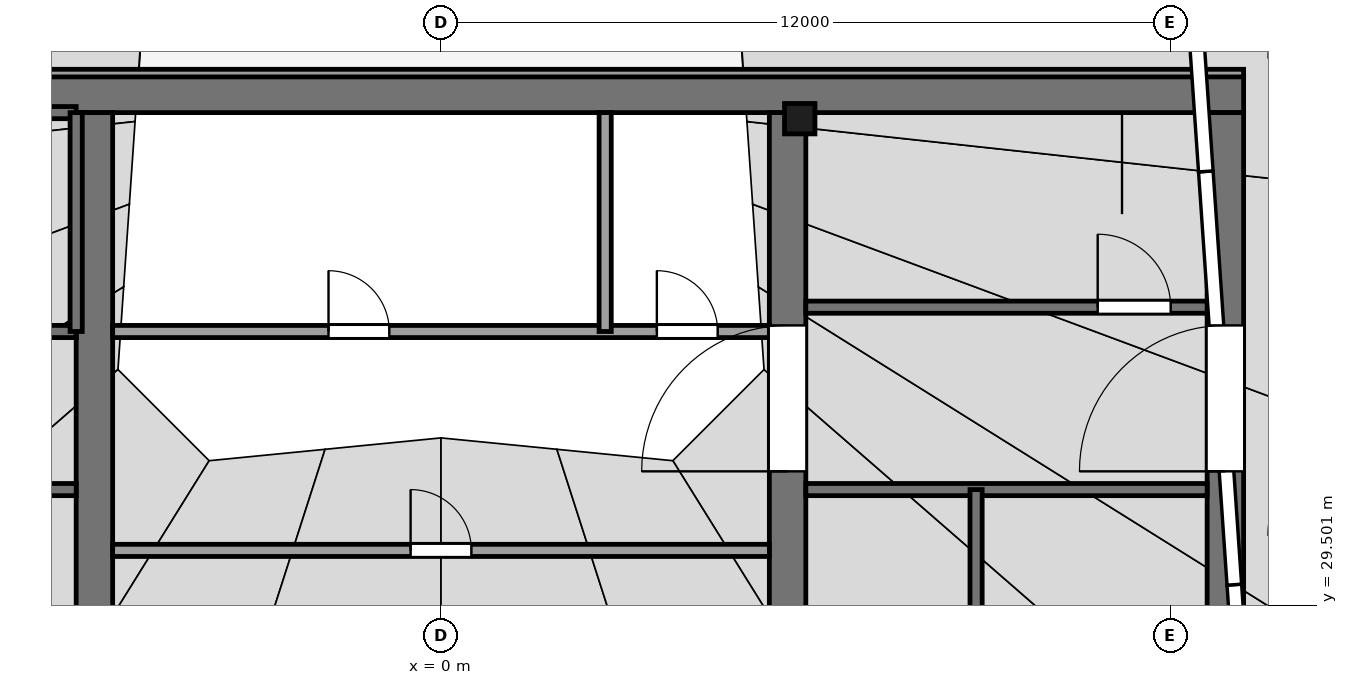
"""IFC4 building model, lengths in metres.
Left out: names, types, materials, properties, quantities, classifications, styles, units other than length and angle.
Written with IfcOpenShell. Run it as: python <this file> out.ifc"""

import sys

from ifc_helpers import new_model, si_unit, direction, frame, frame_2d, origin, origin_2d, place, context, subcontext, project, spatial, rectangle, extrude, element, fill, save


model = new_model("IFC4")
c1 = context("Model", 3, precision=1e-05, world=origin(), true_north=direction((0.0, 1.0)))
c2 = subcontext(c1, "Body", "Model", "MODEL_VIEW")
j1 = project(units=[si_unit("LENGTHUNIT", "METRE"), si_unit("PLANEANGLEUNIT", "RADIAN")], contexts=[c1])
p1 = place(None, origin())
s1 = spatial("IfcSite", under=j1, at=p1, CompositionType="ELEMENT")
p2 = place(p1, origin())
s2 = spatial("IfcBuilding", under=s1, at=p2, CompositionType="ELEMENT")
p3 = place(p2, frame((0.0, 0.0, 368.0)))
s3 = spatial("IfcBuildingStorey", under=s2, at=p3, CompositionType="ELEMENT", Elevation=368.0)
p4 = place(p3, frame((-13.2, 37.9, -0.15), z_axis=(0.0, 0.0, 1.0), x_axis=(1.0, 0.0, 0.0)))
e1 = element("IfcWall", 1, at=p4, inside=s3, PredefinedType="SHEAR", context=c2, shape_type="SweptSolid", body=[
    extrude(rectangle(XDim=26.4, YDim=0.6, at=frame_2d((13.2, 0.0))), origin(), (0.0, 0.0, 1.0), 3.45),
])
p5 = place(p3, frame((12.9, 18.4, -0.15), z_axis=(0.0, 0.0, 1.0), x_axis=(0.0, 1.0, 0.0)))
e2 = element("IfcWall", 2, at=p5, inside=s3, PredefinedType="SHEAR", context=c2, shape_type="SweptSolid", body=[
    extrude(rectangle(XDim=19.2, YDim=0.6, at=frame_2d((9.6, 0.0))), origin(), (0.0, 0.0, 1.0), 3.45),
])
p6 = place(p5, frame((2.8, 0.0, 0.15)))
e3 = element("IfcOpeningElement", 3, at=p6, cuts=e2, PredefinedType="OPENING", context=c2, shape_type="SweptSolid", body=[
    extrude(rectangle(XDim=2.4, YDim=2.4, at=frame_2d((1.2, 1.2))), frame((0.0, 0.31, 0.0), z_axis=(0.0, -1.0, 0.0), x_axis=(1.0, 0.0, 0.0)), (0.0, 0.0, 1.0), 0.62),
])
p7 = place(p5, frame((13.3, 0.0, 0.15)))
e4 = element("IfcOpeningElement", 4, at=p7, cuts=e2, PredefinedType="OPENING", context=c2, shape_type="SweptSolid", body=[
    extrude(rectangle(XDim=2.4, YDim=2.4, at=frame_2d((1.2, 1.2))), frame((0.0, 0.31, 0.0), z_axis=(0.0, -1.0, 0.0), x_axis=(1.0, 0.0, 0.0)), (0.0, 0.0, 1.0), 0.62),
])
p8 = place(p3, frame((-5.7, 18.4, -0.15), z_axis=(0.0, 0.0, 1.0), x_axis=(0.0, 1.0, 0.0)))
e5 = element("IfcWall", 5, at=p8, inside=s3, PredefinedType="SHEAR", context=c2, shape_type="SweptSolid", body=[
    extrude(rectangle(XDim=19.2, YDim=0.6, at=frame_2d((9.6, 0.0))), origin(), (0.0, 0.0, 1.0), 3.45),
])
p9 = place(p8, frame((8.35, 0.0, 0.15)))
e6 = element("IfcOpeningElement", 6, at=p9, cuts=e5, PredefinedType="OPENING", context=c2, shape_type="SweptSolid", body=[
    extrude(rectangle(XDim=0.9, YDim=2.1, at=frame_2d((0.45, 1.05))), frame((0.0, 0.31, 0.0), z_axis=(0.0, -1.0, 0.0), x_axis=(1.0, 0.0, 0.0)), (0.0, 0.0, 1.0), 0.62),
])
p10 = place(p3, frame((5.7, 18.4, -0.15), z_axis=(0.0, 0.0, 1.0), x_axis=(0.0, 1.0, 0.0)))
e7 = element("IfcWall", 7, at=p10, inside=s3, PredefinedType="SHEAR", context=c2, shape_type="SweptSolid", body=[
    extrude(rectangle(XDim=19.2, YDim=0.6, at=frame_2d((9.6, 0.0))), origin(), (0.0, 0.0, 1.0), 3.45),
])
p11 = place(p10, frame((13.3, 0.0, 0.15)))
e8 = element("IfcOpeningElement", 8, at=p11, cuts=e7, PredefinedType="OPENING", context=c2, shape_type="SweptSolid", body=[
    extrude(rectangle(XDim=2.4, YDim=2.4, at=frame_2d((1.2, 1.2))), frame((0.0, 0.31, 0.0), z_axis=(0.0, -1.0, 0.0), x_axis=(1.0, 0.0, 0.0)), (0.0, 0.0, 1.0), 0.62),
])
p12 = place(p3, frame((5.9, 37.5, 3.5), z_axis=(0.0, 0.0, 1.0), x_axis=(1.0, 0.0, 0.0)))
e9 = element("IfcColumn", 9, at=p12, inside=s3, PredefinedType="COLUMN", context=c2, shape_type="SweptSolid", body=[
    extrude(rectangle(XDim=0.5, YDim=0.5, at=origin_2d()), origin(), (0.0, 0.0, 1.0), 0.8),
])
p13 = place(p3, frame((-5.4, 30.4, 0.0), z_axis=(0.0, 0.0, 1.0), x_axis=(1.0, 0.0, 0.0)))
e10 = element("IfcWall", 10, at=p13, inside=s3, PredefinedType="PARTITIONING", context=c2, shape_type="SweptSolid", body=[
    extrude(rectangle(XDim=10.8, YDim=0.2, at=frame_2d((5.4, 0.0))), origin(), (0.0, 0.0, 1.0), 3.3),
])
p14 = place(p13, frame((4.9, 0.0, 0.0)))
e11 = element("IfcOpeningElement", 11, at=p14, cuts=e10, PredefinedType="OPENING", context=c2, shape_type="SweptSolid", body=[
    extrude(rectangle(XDim=1.0, YDim=2.1, at=frame_2d((0.5, 1.05))), frame((0.0, 0.11, 0.0), z_axis=(0.0, -1.0, 0.0), x_axis=(1.0, 0.0, 0.0)), (0.0, 0.0, 1.0), 0.22),
])
p15 = place(p3, frame((-12.6, 31.4, 0.0), z_axis=(0.0, 0.0, 1.0), x_axis=(1.0, 0.0, 0.0)))
e12 = element("IfcWall", 12, at=p15, inside=s3, PredefinedType="PARTITIONING", context=c2, shape_type="SweptSolid", body=[
    extrude(rectangle(XDim=6.6, YDim=0.2, at=frame_2d((3.3, 0.0))), origin(), (0.0, 0.0, 1.0), 3.3),
])
p16 = place(p15, frame((1.0, 0.0, 0.0)))
e13 = element("IfcOpeningElement", 13, at=p16, cuts=e12, PredefinedType="OPENING", context=c2, shape_type="SweptSolid", body=[
    extrude(rectangle(XDim=1.2, YDim=2.2, at=frame_2d((0.6, 1.1))), frame((0.0, 0.11, 0.0), z_axis=(0.0, -1.0, 0.0), x_axis=(1.0, 0.0, 0.0)), (0.0, 0.0, 1.0), 0.22),
])
p17 = place(p3, frame((6.0, 31.4, 0.0), z_axis=(0.0, 0.0, 1.0), x_axis=(1.0, 0.0, 0.0)))
e14 = element("IfcWall", 14, at=p17, inside=s3, PredefinedType="PARTITIONING", context=c2, shape_type="SweptSolid", body=[
    extrude(rectangle(XDim=6.6, YDim=0.2, at=frame_2d((3.3, 0.0))), origin(), (0.0, 0.0, 1.0), 3.3),
])
p18 = place(p3, frame((-12.6, 34.0, 0.0), z_axis=(0.0, 0.0, 1.0), x_axis=(1.0, 0.0, 0.0)))
e15 = element("IfcWall", 15, at=p18, inside=s3, PredefinedType="PARTITIONING", context=c2, shape_type="SweptSolid", body=[
    extrude(rectangle(XDim=6.6, YDim=0.2, at=frame_2d((3.3, 0.0))), origin(), (0.0, 0.0, 1.0), 3.3),
])
p19 = place(p18, frame((4.7, 0.0, 0.0)))
e16 = element("IfcOpeningElement", 16, at=p19, cuts=e15, PredefinedType="OPENING", context=c2, shape_type="SweptSolid", body=[
    extrude(rectangle(XDim=1.4, YDim=2.2, at=frame_2d((0.7, 1.1))), frame((0.0, 0.11, 0.0), z_axis=(0.0, -1.0, 0.0), x_axis=(1.0, 0.0, 0.0)), (0.0, 0.0, 1.0), 0.22),
])
p20 = place(p18, frame((2.3, 0.0, 0.0)))
e17 = element("IfcOpeningElement", 17, at=p20, cuts=e15, PredefinedType="OPENING", context=c2, shape_type="SweptSolid", body=[
    extrude(rectangle(XDim=1.4, YDim=2.2, at=frame_2d((0.7, 1.1))), frame((0.0, 0.11, 0.0), z_axis=(0.0, -1.0, 0.0), x_axis=(1.0, 0.0, 0.0)), (0.0, 0.0, 1.0), 0.22),
])
p21 = place(p18, frame((0.45, 0.0, 0.0)))
e18 = element("IfcOpeningElement", 18, at=p21, cuts=e15, PredefinedType="OPENING", context=c2, shape_type="SweptSolid", body=[
    extrude(rectangle(XDim=0.9, YDim=2.1, at=frame_2d((0.45, 1.05))), frame((0.0, 0.11, 0.0), z_axis=(0.0, -1.0, 0.0), x_axis=(1.0, 0.0, 0.0)), (0.0, 0.0, 1.0), 0.22),
])
p22 = place(p3, frame((-5.4, 34.0, 0.0), z_axis=(0.0, 0.0, 1.0), x_axis=(1.0, 0.0, 0.0)))
e19 = element("IfcWall", 19, at=p22, inside=s3, PredefinedType="PARTITIONING", context=c2, shape_type="SweptSolid", body=[
    extrude(rectangle(XDim=10.8, YDim=0.2, at=frame_2d((5.4, 0.0))), origin(), (0.0, 0.0, 1.0), 3.3),
])
p23 = place(p22, frame((3.55, 0.0, 0.0)))
e20 = element("IfcOpeningElement", 20, at=p23, cuts=e19, PredefinedType="OPENING", context=c2, shape_type="SweptSolid", body=[
    extrude(rectangle(XDim=1.0, YDim=2.1, at=frame_2d((0.5, 1.05))), frame((0.0, 0.11, 0.0), z_axis=(0.0, -1.0, 0.0), x_axis=(1.0, 0.0, 0.0)), (0.0, 0.0, 1.0), 0.22),
])
p24 = place(p22, frame((8.95, 0.0, 0.0)))
e21 = element("IfcOpeningElement", 21, at=p24, cuts=e19, PredefinedType="OPENING", context=c2, shape_type="SweptSolid", body=[
    extrude(rectangle(XDim=1.0, YDim=2.1, at=frame_2d((0.5, 1.05))), frame((0.0, 0.11, 0.0), z_axis=(0.0, -1.0, 0.0), x_axis=(1.0, 0.0, 0.0)), (0.0, 0.0, 1.0), 0.22),
])
p25 = place(p3, frame((6.0, 34.4, 0.0), z_axis=(0.0, 0.0, 1.0), x_axis=(1.0, 0.0, 0.0)))
e22 = element("IfcWall", 22, at=p25, inside=s3, PredefinedType="PARTITIONING", context=c2, shape_type="SweptSolid", body=[
    extrude(rectangle(XDim=6.6, YDim=0.2, at=frame_2d((3.3, 0.0))), origin(), (0.0, 0.0, 1.0), 3.3),
])
p26 = place(p25, frame((4.8, 0.0, 0.0)))
e23 = element("IfcOpeningElement", 23, at=p26, cuts=e22, PredefinedType="OPENING", context=c2, shape_type="SweptSolid", body=[
    extrude(rectangle(XDim=1.2, YDim=2.2, at=frame_2d((0.6, 1.1))), frame((0.0, 0.11, 0.0), z_axis=(0.0, -1.0, 0.0), x_axis=(1.0, 0.0, 0.0)), (0.0, 0.0, 1.0), 0.22),
])
p27 = place(p3, frame((2.7, 34.0, 0.0), z_axis=(0.0, 0.0, 1.0), x_axis=(0.0, 1.0, 0.0)))
e24 = element("IfcWall", 24, at=p27, inside=s3, PredefinedType="PARTITIONING", context=c2, shape_type="SweptSolid", body=[
    extrude(rectangle(XDim=3.6, YDim=0.2, at=frame_2d((1.8, 0.0))), origin(), (0.0, 0.0, 1.0), 3.3),
])
p28 = place(p3, frame((8.8, 24.0, 0.0), z_axis=(0.0, 0.0, 1.0), x_axis=(0.0, 1.0, 0.0)))
e25 = element("IfcWall", 25, at=p28, inside=s3, PredefinedType="PARTITIONING", context=c2, shape_type="SweptSolid", body=[
    extrude(rectangle(XDim=7.4, YDim=0.2, at=frame_2d((3.7, 0.0))), origin(), (0.0, 0.0, 1.0), 3.3),
])
for number, where, z_axis, x_axis in (
    (26, (-10.8, 34.0, 3.5), (0.0, 0.0, 1.0), (1.0, 0.0, 0.0)),
    (27, (-10.8, 37.6, 3.5), (0.0, 0.0, 1.0), (1.0, 0.0, 0.0)),
):
    element("IfcWall", number, at=place(p3, frame(where, z_axis=z_axis, x_axis=x_axis)), inside=s3, PredefinedType="PARTITIONING", context=c2, shape_type="SweptSolid", body=[
        extrude(rectangle(XDim=4.8, YDim=0.2, at=frame_2d((2.4, 0.0))), origin(), (0.0, 0.0, 1.0), 5.0),
    ])
p29 = place(p3, frame((-6.0, 34.0, 3.5), z_axis=(0.0, 0.0, 1.0), x_axis=(0.0, 1.0, 0.0)))
e28 = element("IfcWall", 28, at=p29, inside=s3, PredefinedType="PARTITIONING", context=c2, shape_type="SweptSolid", body=[
    extrude(rectangle(XDim=3.6, YDim=0.2, at=frame_2d((1.8, 0.0))), origin(), (0.0, 0.0, 1.0), 5.0),
])
p30 = place(p3, frame((13.2, 38.25, 0.0), z_axis=(0.0, 0.0, 1.0), x_axis=(-1.0, 0.0, 0.0)))
e29 = element("IfcWall", 29, at=p30, inside=s3, PredefinedType="PARTITIONING", context=c2, shape_type="SweptSolid", body=[
    extrude(rectangle(XDim=26.4, YDim=0.125, at=frame_2d((13.2, 0.0))), origin(), (0.0, 0.0, 1.0), 2.82),
])
p31 = place(p14, origin())
e30 = element("IfcDoor", 30, at=p31, inside=s3, OperationType="SINGLE_SWING_LEFT", PredefinedType="DOOR", context=c2, shape_type="SweptSolid", body=[
    extrude(rectangle(XDim=1.0, YDim=2.1, at=frame_2d((0.5, 1.05))), frame((0.0, 0.025, 0.0), z_axis=(0.0, -1.0, 0.0), x_axis=(1.0, 0.0, 0.0)), (0.0, 0.0, 1.0), 0.05),
])
fill(e11, e30)
p32 = place(p23, origin())
e31 = element("IfcDoor", 31, at=p32, inside=s3, OperationType="SINGLE_SWING_LEFT", PredefinedType="DOOR", context=c2, shape_type="SweptSolid", body=[
    extrude(rectangle(XDim=1.0, YDim=2.1, at=frame_2d((0.5, 1.05))), frame((0.0, 0.025, 0.0), z_axis=(0.0, -1.0, 0.0), x_axis=(1.0, 0.0, 0.0)), (0.0, 0.0, 1.0), 0.05),
])
fill(e20, e31)
p33 = place(p24, origin())
e32 = element("IfcDoor", 32, at=p33, inside=s3, OperationType="SINGLE_SWING_LEFT", PredefinedType="DOOR", context=c2, shape_type="SweptSolid", body=[
    extrude(rectangle(XDim=1.0, YDim=2.1, at=frame_2d((0.5, 1.05))), frame((0.0, 0.025, 0.0), z_axis=(0.0, -1.0, 0.0), x_axis=(1.0, 0.0, 0.0)), (0.0, 0.0, 1.0), 0.05),
])
fill(e21, e32)
p34 = place(p26, origin())
e33 = element("IfcDoor", 33, at=p34, inside=s3, OperationType="SINGLE_SWING_LEFT", PredefinedType="DOOR", context=c2, shape_type="SweptSolid", body=[
    extrude(rectangle(XDim=1.2, YDim=2.2, at=frame_2d((0.6, 1.1))), frame((0.0, 0.025, 0.0), z_axis=(0.0, -1.0, 0.0), x_axis=(1.0, 0.0, 0.0)), (0.0, 0.0, 1.0), 0.05),
])
fill(e23, e33)
p35 = place(p11, origin())
e34 = element("IfcDoor", 34, at=p35, inside=s3, OperationType="DOUBLE_DOOR_SINGLE_SWING", PredefinedType="DOOR", context=c2, shape_type="SweptSolid", body=[
    extrude(rectangle(XDim=2.4, YDim=2.4, at=frame_2d((1.2, 1.2))), frame((0.0, 0.025, 0.0), z_axis=(0.0, -1.0, 0.0), x_axis=(1.0, 0.0, 0.0)), (0.0, 0.0, 1.0), 0.05),
])
fill(e8, e34)
p36 = place(p7, origin())
e35 = element("IfcDoor", 35, at=p36, inside=s3, OperationType="DOUBLE_DOOR_SINGLE_SWING", PredefinedType="DOOR", context=c2, shape_type="SweptSolid", body=[
    extrude(rectangle(XDim=2.4, YDim=2.4, at=frame_2d((1.2, 1.2))), frame((0.0, 0.025, 0.0), z_axis=(0.0, -1.0, 0.0), x_axis=(1.0, 0.0, 0.0)), (0.0, 0.0, 1.0), 0.05),
])
fill(e4, e35)
save(model, sys.argv[1])
